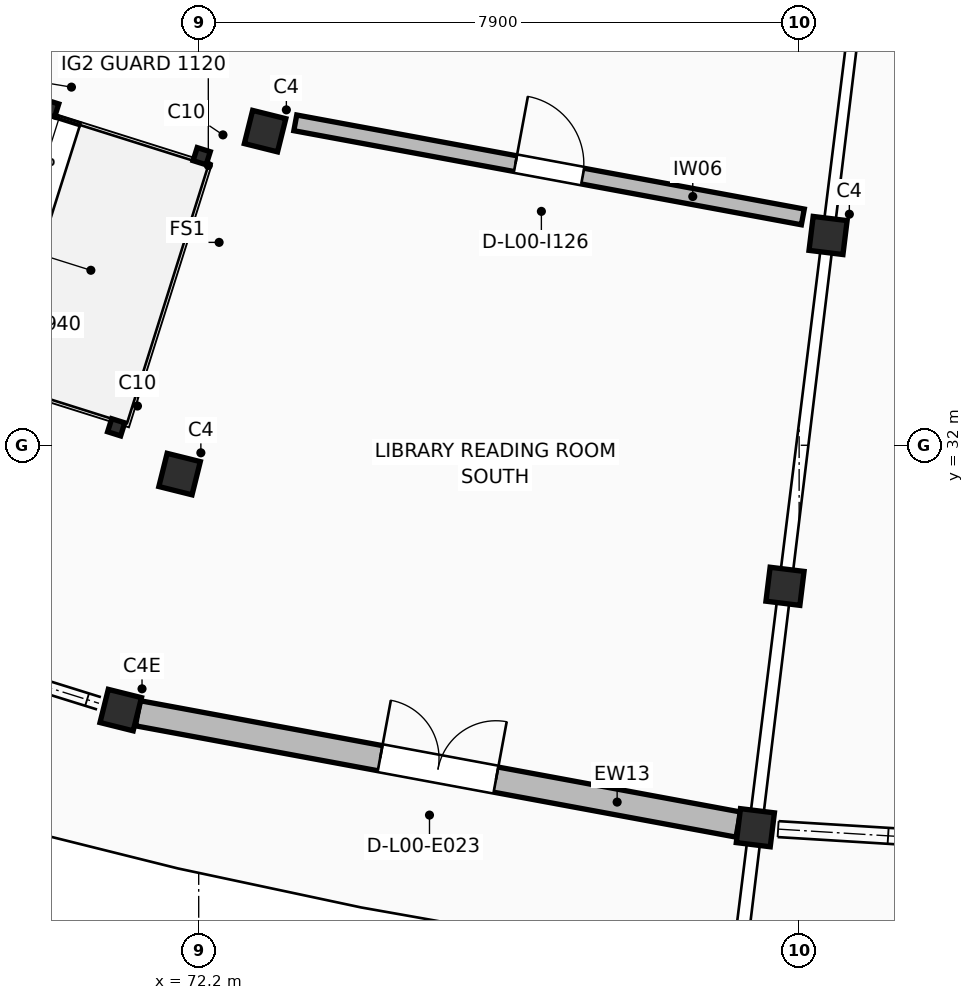
"""IFC4 building model, lengths in metres.
Left out: names, types, materials, properties, quantities, classifications, styles, units other than length and angle.
Written with IfcOpenShell. Run it as: python <this file> out.ifc"""

import sys

from ifc_helpers import new_model, si_unit, direction, frame, frame_2d, origin, origin_2d, place, context, subcontext, project, spatial, rectangle, hollow_rectangle, extrude, element, fill, save


model = new_model("IFC4")
c1 = context("Model", 3, precision=1e-05, world=origin(), true_north=direction((0.0, 1.0)))
c2 = subcontext(c1, "Body", "Model", "MODEL_VIEW")
j1 = project(units=[si_unit("LENGTHUNIT", "METRE"), si_unit("PLANEANGLEUNIT", "RADIAN")], contexts=[c1])
p1 = place(None, origin())
s1 = spatial("IfcSite", under=j1, at=p1, CompositionType="ELEMENT")
p2 = place(p1, origin())
s2 = spatial("IfcBuilding", under=s1, at=p2, CompositionType="ELEMENT")
p3 = place(p2, origin())
s3 = spatial("IfcBuildingStorey", under=s2, at=p3, CompositionType="ELEMENT", Elevation=0.0)
for number, where, z_axis, x_axis in (
    (1, (73.073, 36.133, 0.0), (0.0, 0.0, 1.0), (-0.242, -0.97, 0.0)),
    (2, (71.948, 31.621, 0.0), (0.0, 0.0, 1.0), (-0.242, -0.97, 0.0)),
    (3, (71.174, 28.516, 0.0), (0.0, 0.0, 1.0), (-0.242, -0.97, 0.0)),
    (4, (80.481, 34.76, 0.0), (0.0, 0.0, 1.0), (-0.122, -0.993, 0.0)),
    (5, (79.914, 30.145, 0.0), (0.0, 0.0, 1.0), (-0.122, -0.993, 0.0)),
    (6, (79.524, 26.969, 0.0), (0.0, 0.0, 1.0), (-0.122, -0.993, 0.0)),
):
    element("IfcColumn", number, at=place(p3, frame(where, z_axis=z_axis, x_axis=x_axis)), inside=s3, PredefinedType="COLUMN", context=c2, shape_type="SweptSolid", body=[
        extrude(rectangle(XDim=0.45, YDim=0.45, at=origin_2d()), origin(), (0.0, 0.0, 1.0), 4.42),
    ])
p4 = place(p3, frame((71.398, 28.474, 0.0), z_axis=(0.0, 0.0, 1.0), x_axis=(0.983256610621, -0.182226336377, 0.0)))
e7 = element("IfcWall", 7, at=p4, inside=s3, PredefinedType="STANDARD", context=c2, shape_type="SweptSolid", body=[
    extrude(rectangle(XDim=8.036, YDim=0.336, at=frame_2d((4.018, 0.0))), origin(), (0.0, 0.0, 1.0), 3.4),
])
p5 = place(p4, frame((3.243, 0.0, 0.0)))
e8 = element("IfcOpeningElement", 8, at=p5, cuts=e7, PredefinedType="OPENING", context=c2, shape_type="SweptSolid", body=[
    extrude(rectangle(XDim=1.55, YDim=2.22, at=frame_2d((0.775, 1.11))), frame((0.0, 0.178, 0.0), z_axis=(0.0, -1.0, 0.0), x_axis=(1.0, 0.0, 0.0)), (0.0, 0.0, 1.0), 0.356),
])
for number, where, z_axis, x_axis in (
    (9, (70.246, 36.432, 0.0), (0.0, 0.0, 1.0), (0.954, -0.301, 0.0)),
    (10, (71.115, 32.236, 0.0), (0.0, 0.0, 1.0), (0.954, -0.301, 0.0)),
    (11, (72.239, 35.803, 0.0), (0.0, 0.0, 1.0), (0.954, -0.301, 0.0)),
):
    element("IfcColumn", number, at=place(p3, frame(where, z_axis=z_axis, x_axis=x_axis)), inside=s3, PredefinedType="COLUMN", context=c2, shape_type="SweptSolid", body=[
        extrude(hollow_rectangle(XDim=0.18, YDim=0.18, WallThickness=0.01, InnerFilletRadius=0.01, OuterFilletRadius=0.02, at=origin_2d()), origin(), (0.0, 0.0, 1.0), 4.42),
    ])
p6 = place(p3, frame((73.471, 36.242, 0.0), z_axis=(0.0, 0.0, 1.0), x_axis=(0.983257442509, -0.182221847619, 0.0)))
e12 = element("IfcWall", 12, at=p6, inside=s3, PredefinedType="STANDARD", context=c2, shape_type="SweptSolid", body=[
    extrude(rectangle(XDim=6.792, YDim=0.21, at=frame_2d((3.396, 0.0))), origin(), (0.0, 0.0, 1.0), 3.38),
])
p7 = place(p6, frame((2.946, 0.0, 0.0)))
e13 = element("IfcOpeningElement", 13, at=p7, cuts=e12, PredefinedType="OPENING", context=c2, shape_type="SweptSolid", body=[
    extrude(rectangle(XDim=0.9, YDim=2.18, at=frame_2d((0.45, 1.09))), frame((0.0, 0.115, 0.0), z_axis=(0.0, -1.0, 0.0), x_axis=(1.0, 0.0, 0.0)), (0.0, 0.0, 1.0), 0.23),
])
p8 = place(p5, frame((1.55, 0.0, 0.0), z_axis=(0.0, 0.0, 1.0), x_axis=(-1.0, 0.0, 0.0)))
e14 = element("IfcDoor", 14, at=p8, inside=s3, OperationType="DOUBLE_DOOR_SINGLE_SWING", PredefinedType="DOOR", context=c2, shape_type="SweptSolid", body=[
    extrude(rectangle(XDim=1.55, YDim=2.22, at=frame_2d((0.775, 1.11))), frame((0.0, 0.025, 0.0), z_axis=(0.0, -1.0, 0.0), x_axis=(1.0, 0.0, 0.0)), (0.0, 0.0, 1.0), 0.05),
])
fill(e8, e14)
p9 = place(p7, origin())
e15 = element("IfcDoor", 15, at=p9, inside=s3, OperationType="SINGLE_SWING_LEFT", PredefinedType="DOOR", context=c2, shape_type="SweptSolid", body=[
    extrude(rectangle(XDim=0.9, YDim=2.18, at=frame_2d((0.45, 1.09))), frame((0.0, 0.025, 0.0), z_axis=(0.0, -1.0, 0.0), x_axis=(1.0, 0.0, 0.0)), (0.0, 0.0, 1.0), 0.05),
])
fill(e13, e15)
save(model, sys.argv[1])
